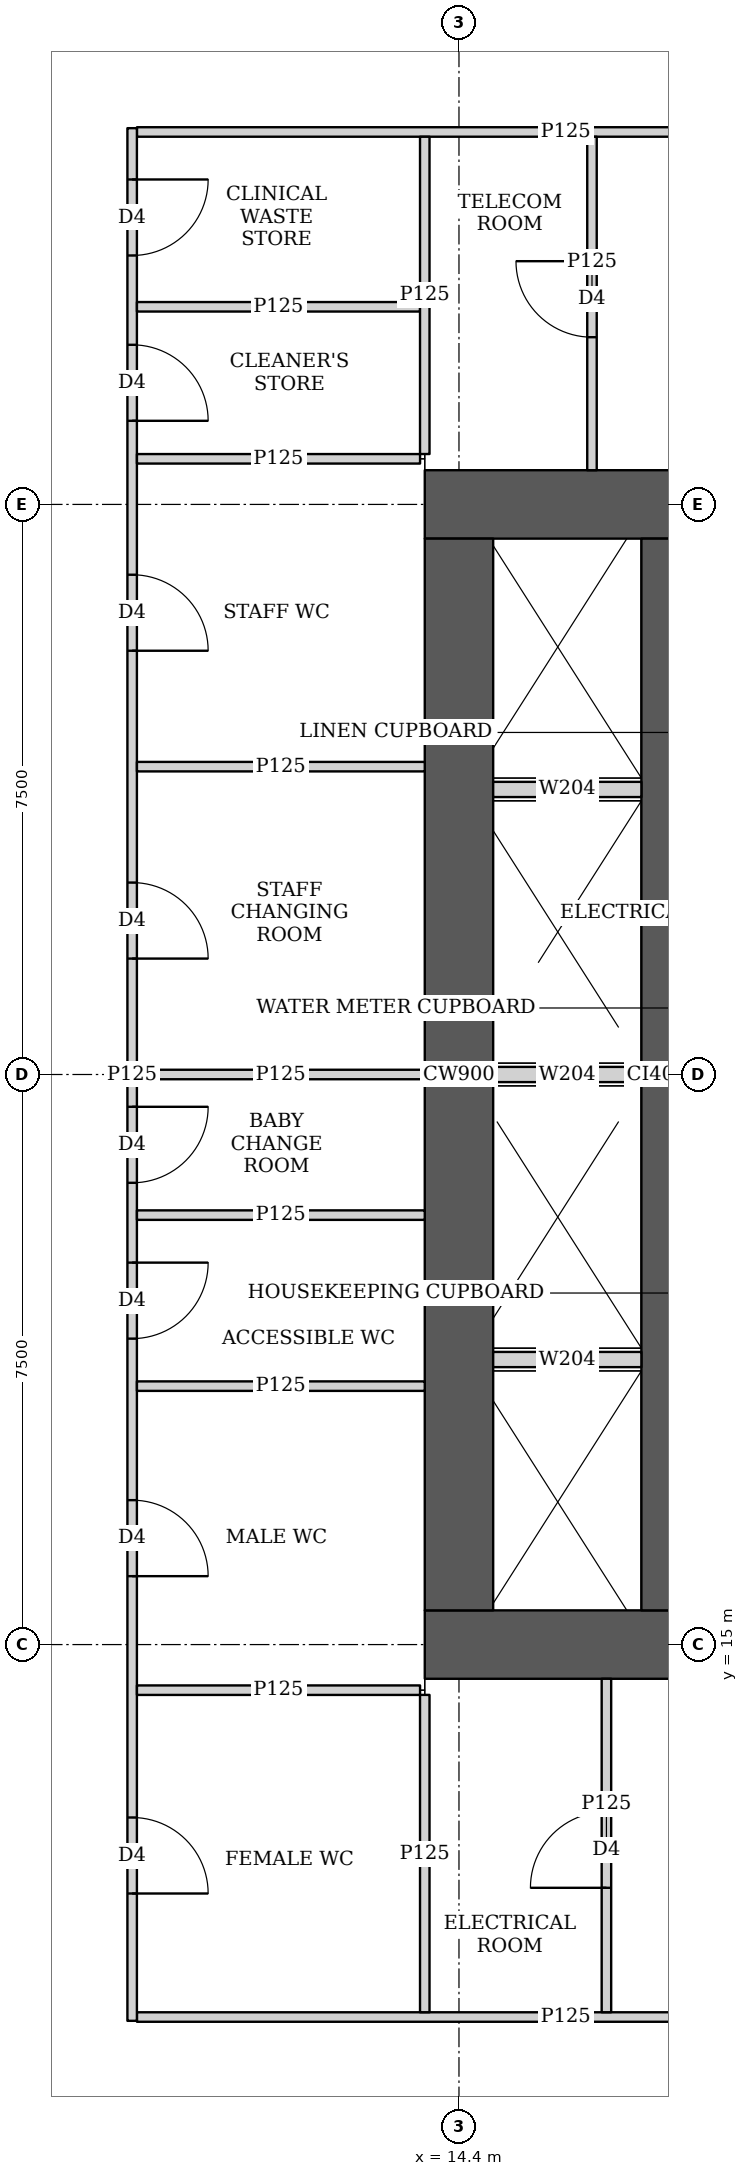
"""IFC4 building model, lengths in metres.
Left out: names, types, materials, properties, quantities, classifications, styles, units other than length and angle.
Written with IfcOpenShell. Run it as: python <this file> out.ifc"""

import sys

from ifc_helpers import new_model, si_unit, direction, frame, frame_2d, origin, place, context, subcontext, project, spatial, rectangle, extrude, element, fill, save


model = new_model("IFC4")
c1 = context("Model", 3, precision=1e-05, world=origin(), true_north=direction((0.0, 1.0)))
c2 = subcontext(c1, "Body", "Model", "MODEL_VIEW")
j1 = project(units=[si_unit("LENGTHUNIT", "METRE"), si_unit("PLANEANGLEUNIT", "RADIAN")], contexts=[c1])
p1 = place(None, origin())
s1 = spatial("IfcSite", under=j1, at=p1, CompositionType="ELEMENT")
p2 = place(p1, origin())
s2 = spatial("IfcBuilding", under=s1, at=p2, CompositionType="ELEMENT")
p3 = place(p2, frame((0.0, 0.0, 5.6)))
s3 = spatial("IfcBuildingStorey", under=s2, at=p3, CompositionType="ELEMENT", Elevation=5.6)
p4 = place(p3, frame((13.95, 15.0, 0.0), z_axis=(0.0, 0.0, 1.0), x_axis=(1.0, 0.0, 0.0)))
e1 = element("IfcWall", 1, at=p4, inside=s3, PredefinedType="SHEAR", context=c2, shape_type="SweptSolid", body=[
    extrude(rectangle(XDim=15.3, YDim=0.9, at=frame_2d((7.65, 0.0))), origin(), (0.0, 0.0, 1.0), 4.5),
])
p5 = place(p4, frame((4.45, 0.0, 0.0)))
e2 = element("IfcOpeningElement", 2, at=p5, cuts=e1, PredefinedType="OPENING", context=c2, shape_type="SweptSolid", body=[
    extrude(rectangle(XDim=1.8, YDim=2.1, at=frame_2d((0.9, 1.05))), frame((0.0, 0.46, 0.0), z_axis=(0.0, -1.0, 0.0), x_axis=(1.0, 0.0, 0.0)), (0.0, 0.0, 1.0), 0.92),
])
p6 = place(p4, frame((10.7, 0.0, 0.0)))
e3 = element("IfcOpeningElement", 3, at=p6, cuts=e1, PredefinedType="OPENING", context=c2, shape_type="SweptSolid", body=[
    extrude(rectangle(XDim=1.1, YDim=2.1, at=frame_2d((0.55, 1.05))), frame((0.0, 0.46, 0.0), z_axis=(0.0, -1.0, 0.0), x_axis=(1.0, 0.0, 0.0)), (0.0, 0.0, 1.0), 0.92),
])
p7 = place(p3, frame((13.95, 30.0, 0.0), z_axis=(0.0, 0.0, 1.0), x_axis=(1.0, 0.0, 0.0)))
e4 = element("IfcWall", 4, at=p7, inside=s3, PredefinedType="SHEAR", context=c2, shape_type="SweptSolid", body=[
    extrude(rectangle(XDim=15.3, YDim=0.9, at=frame_2d((7.65, 0.0))), origin(), (0.0, 0.0, 1.0), 4.5),
])
p8 = place(p7, frame((4.45, 0.0, 0.0)))
e5 = element("IfcOpeningElement", 5, at=p8, cuts=e4, PredefinedType="OPENING", context=c2, shape_type="SweptSolid", body=[
    extrude(rectangle(XDim=1.8, YDim=2.1, at=frame_2d((0.9, 1.05))), frame((0.0, 0.46, 0.0), z_axis=(0.0, -1.0, 0.0), x_axis=(1.0, 0.0, 0.0)), (0.0, 0.0, 1.0), 0.92),
])
p9 = place(p7, frame((10.7, 0.0, 0.0)))
e6 = element("IfcOpeningElement", 6, at=p9, cuts=e4, PredefinedType="OPENING", context=c2, shape_type="SweptSolid", body=[
    extrude(rectangle(XDim=1.1, YDim=2.1, at=frame_2d((0.55, 1.05))), frame((0.0, 0.46, 0.0), z_axis=(0.0, -1.0, 0.0), x_axis=(1.0, 0.0, 0.0)), (0.0, 0.0, 1.0), 0.92),
])
p10 = place(p3, frame((14.4, 15.45, 0.0), z_axis=(0.0, 0.0, 1.0), x_axis=(0.0, 1.0, 0.0)))
e7 = element("IfcWall", 7, at=p10, inside=s3, PredefinedType="SHEAR", context=c2, shape_type="SweptSolid", body=[
    extrude(rectangle(XDim=14.1, YDim=0.9, at=frame_2d((7.05, 0.0))), origin(), (0.0, 0.0, 1.0), 4.5),
])
p11 = place(p3, frame((17.0, 15.45, 0.0), z_axis=(0.0, 0.0, 1.0), x_axis=(0.0, 1.0, 0.0)))
e8 = element("IfcWall", 8, at=p11, inside=s3, PredefinedType="SHEAR", context=c2, shape_type="SweptSolid", body=[
    extrude(rectangle(XDim=14.1, YDim=0.4, at=frame_2d((7.05, 0.0))), origin(), (0.0, 0.0, 1.0), 4.5),
])
p12 = place(p3, frame((10.1, 10.05, 0.0), z_axis=(0.0, 0.0, 1.0), x_axis=(0.0, 1.0, 0.0)))
e9 = element("IfcWall", 9, at=p12, inside=s3, PredefinedType="PARTITIONING", context=c2, shape_type="SweptSolid", body=[
    extrude(rectangle(XDim=24.9, YDim=0.125, at=frame_2d((12.45, 0.0))), origin(), (0.0, 0.0, 1.0), 2.6),
])
p13 = place(p12, frame((1.675, 0.0, 0.0)))
e10 = element("IfcOpeningElement", 10, at=p13, cuts=e9, PredefinedType="OPENING", context=c2, shape_type="SweptSolid", body=[
    extrude(rectangle(XDim=1.0, YDim=2.1, at=frame_2d((0.5, 1.05))), frame((0.0, 0.073, 0.0), z_axis=(0.0, -1.0, 0.0), x_axis=(1.0, 0.0, 0.0)), (0.0, 0.0, 1.0), 0.145),
])
p14 = place(p12, frame((5.85, 0.0, 0.0)))
e11 = element("IfcOpeningElement", 11, at=p14, cuts=e9, PredefinedType="OPENING", context=c2, shape_type="SweptSolid", body=[
    extrude(rectangle(XDim=1.0, YDim=2.1, at=frame_2d((0.5, 1.05))), frame((0.0, 0.073, 0.0), z_axis=(0.0, -1.0, 0.0), x_axis=(1.0, 0.0, 0.0)), (0.0, 0.0, 1.0), 0.145),
])
p15 = place(p12, frame((8.975, 0.0, 0.0)))
e12 = element("IfcOpeningElement", 12, at=p15, cuts=e9, PredefinedType="OPENING", context=c2, shape_type="SweptSolid", body=[
    extrude(rectangle(XDim=1.0, YDim=2.1, at=frame_2d((0.5, 1.05))), frame((0.0, 0.073, 0.0), z_axis=(0.0, -1.0, 0.0), x_axis=(1.0, 0.0, 0.0)), (0.0, 0.0, 1.0), 0.145),
])
p16 = place(p12, frame((11.025, 0.0, 0.0)))
e13 = element("IfcOpeningElement", 13, at=p16, cuts=e9, PredefinedType="OPENING", context=c2, shape_type="SweptSolid", body=[
    extrude(rectangle(XDim=1.0, YDim=2.1, at=frame_2d((0.5, 1.05))), frame((0.0, 0.073, 0.0), z_axis=(0.0, -1.0, 0.0), x_axis=(1.0, 0.0, 0.0)), (0.0, 0.0, 1.0), 0.145),
])
p17 = place(p12, frame((13.975, 0.0, 0.0)))
e14 = element("IfcOpeningElement", 14, at=p17, cuts=e9, PredefinedType="OPENING", context=c2, shape_type="SweptSolid", body=[
    extrude(rectangle(XDim=1.0, YDim=2.1, at=frame_2d((0.5, 1.05))), frame((0.0, 0.073, 0.0), z_axis=(0.0, -1.0, 0.0), x_axis=(1.0, 0.0, 0.0)), (0.0, 0.0, 1.0), 0.145),
])
p18 = place(p12, frame((18.025, 0.0, 0.0)))
e15 = element("IfcOpeningElement", 15, at=p18, cuts=e9, PredefinedType="OPENING", context=c2, shape_type="SweptSolid", body=[
    extrude(rectangle(XDim=1.0, YDim=2.1, at=frame_2d((0.5, 1.05))), frame((0.0, 0.073, 0.0), z_axis=(0.0, -1.0, 0.0), x_axis=(1.0, 0.0, 0.0)), (0.0, 0.0, 1.0), 0.145),
])
p19 = place(p12, frame((21.05, 0.0, 0.0)))
e16 = element("IfcOpeningElement", 16, at=p19, cuts=e9, PredefinedType="OPENING", context=c2, shape_type="SweptSolid", body=[
    extrude(rectangle(XDim=1.0, YDim=2.1, at=frame_2d((0.5, 1.05))), frame((0.0, 0.073, 0.0), z_axis=(0.0, -1.0, 0.0), x_axis=(1.0, 0.0, 0.0)), (0.0, 0.0, 1.0), 0.145),
])
p20 = place(p12, frame((23.225, 0.0, 0.0)))
e17 = element("IfcOpeningElement", 17, at=p20, cuts=e9, PredefinedType="OPENING", context=c2, shape_type="SweptSolid", body=[
    extrude(rectangle(XDim=1.0, YDim=2.1, at=frame_2d((0.5, 1.05))), frame((0.0, 0.073, 0.0), z_axis=(0.0, -1.0, 0.0), x_axis=(1.0, 0.0, 0.0)), (0.0, 0.0, 1.0), 0.145),
])
p21 = place(p3, frame((10.163, 14.4, 0.0), z_axis=(0.0, 0.0, 1.0), x_axis=(1.0, 0.0, 0.0)))
e18 = element("IfcWall", 18, at=p21, inside=s3, PredefinedType="PARTITIONING", context=c2, shape_type="SweptSolid", body=[
    extrude(rectangle(XDim=3.725, YDim=0.125, at=frame_2d((1.862, 0.0))), origin(), (0.0, 0.0, 1.0), 2.6),
])
p22 = place(p3, frame((10.163, 22.5, 0.0), z_axis=(0.0, 0.0, 1.0), x_axis=(1.0, 0.0, 0.0)))
e19 = element("IfcWall", 19, at=p22, inside=s3, PredefinedType="PARTITIONING", context=c2, shape_type="SweptSolid", body=[
    extrude(rectangle(XDim=3.787, YDim=0.125, at=frame_2d((1.894, 0.0))), origin(), (0.0, 0.0, 1.0), 2.6),
])
p23 = place(p3, frame((10.163, 30.6, 0.0), z_axis=(0.0, 0.0, 1.0), x_axis=(1.0, 0.0, 0.0)))
e20 = element("IfcWall", 20, at=p23, inside=s3, PredefinedType="PARTITIONING", context=c2, shape_type="SweptSolid", body=[
    extrude(rectangle(XDim=3.725, YDim=0.125, at=frame_2d((1.862, 0.0))), origin(), (0.0, 0.0, 1.0), 2.6),
])
p24 = place(p3, frame((13.95, 10.163, 0.0), z_axis=(0.0, 0.0, 1.0), x_axis=(0.0, 1.0, 0.0)))
e21 = element("IfcWall", 21, at=p24, inside=s3, PredefinedType="PARTITIONING", context=c2, shape_type="SweptSolid", body=[
    extrude(rectangle(XDim=4.175, YDim=0.125, at=frame_2d((2.087, 0.0))), origin(), (0.0, 0.0, 1.0), 2.6),
])
p25 = place(p3, frame((13.95, 30.663, 0.0), z_axis=(0.0, 0.0, 1.0), x_axis=(0.0, 1.0, 0.0)))
e22 = element("IfcWall", 22, at=p25, inside=s3, PredefinedType="PARTITIONING", context=c2, shape_type="SweptSolid", body=[
    extrude(rectangle(XDim=4.174, YDim=0.125, at=frame_2d((2.087, 0.0))), origin(), (0.0, 0.0, 1.0), 2.6),
])
p26 = place(p3, frame((10.163, 10.1, 0.0), z_axis=(0.0, 0.0, 1.0), x_axis=(1.0, 0.0, 0.0)))
e23 = element("IfcWall", 23, at=p26, inside=s3, PredefinedType="PARTITIONING", context=c2, shape_type="SweptSolid", body=[
    extrude(rectangle(XDim=11.287, YDim=0.125, at=frame_2d((5.644, 0.0))), origin(), (0.0, 0.0, 1.0), 2.2),
])
p27 = place(p26, frame((7.832, 0.0, 0.0)))
e24 = element("IfcOpeningElement", 24, at=p27, cuts=e23, PredefinedType="OPENING", context=c2, shape_type="SweptSolid", body=[
    extrude(rectangle(XDim=1.8, YDim=2.1, at=frame_2d((0.9, 1.05))), frame((0.0, 0.073, 0.0), z_axis=(0.0, -1.0, 0.0), x_axis=(1.0, 0.0, 0.0)), (0.0, 0.0, 1.0), 0.145),
])
p28 = place(p3, frame((10.163, 34.9, 0.0), z_axis=(0.0, 0.0, 1.0), x_axis=(1.0, 0.0, 0.0)))
e25 = element("IfcWall", 25, at=p28, inside=s3, PredefinedType="PARTITIONING", context=c2, shape_type="SweptSolid", body=[
    extrude(rectangle(XDim=11.287, YDim=0.125, at=frame_2d((5.644, 0.0))), origin(), (0.0, 0.0, 1.0), 2.2),
])
p29 = place(p28, frame((7.737, 0.0, 0.0)))
e26 = element("IfcOpeningElement", 26, at=p29, cuts=e25, PredefinedType="OPENING", context=c2, shape_type="SweptSolid", body=[
    extrude(rectangle(XDim=1.8, YDim=2.1, at=frame_2d((0.9, 1.05))), frame((0.0, 0.073, 0.0), z_axis=(0.0, -1.0, 0.0), x_axis=(1.0, 0.0, 0.0)), (0.0, 0.0, 1.0), 0.145),
])
p30 = place(p3, frame((16.34, 10.163, 0.0), z_axis=(0.0, 0.0, 1.0), x_axis=(0.0, 1.0, 0.0)))
e27 = element("IfcWall", 27, at=p30, inside=s3, PredefinedType="PARTITIONING", context=c2, shape_type="SweptSolid", body=[
    extrude(rectangle(XDim=4.387, YDim=0.125, at=frame_2d((2.193, 0.0))), origin(), (0.0, 0.0, 1.0), 4.2),
])
p31 = place(p30, frame((1.637, 0.0, 0.0)))
e28 = element("IfcOpeningElement", 28, at=p31, cuts=e27, PredefinedType="OPENING", context=c2, shape_type="SweptSolid", body=[
    extrude(rectangle(XDim=1.0, YDim=2.1, at=frame_2d((0.5, 1.05))), frame((0.0, 0.073, 0.0), z_axis=(0.0, -1.0, 0.0), x_axis=(1.0, 0.0, 0.0)), (0.0, 0.0, 1.0), 0.145),
])
p32 = place(p3, frame((16.15, 30.45, 0.0), z_axis=(0.0, 0.0, 1.0), x_axis=(0.0, 1.0, 0.0)))
e29 = element("IfcWall", 29, at=p32, inside=s3, PredefinedType="PARTITIONING", context=c2, shape_type="SweptSolid", body=[
    extrude(rectangle(XDim=4.387, YDim=0.125, at=frame_2d((2.193, 0.0))), origin(), (0.0, 0.0, 1.0), 4.2),
])
p33 = place(p32, frame((1.75, 0.0, 0.0)))
e30 = element("IfcOpeningElement", 30, at=p33, cuts=e29, PredefinedType="OPENING", context=c2, shape_type="SweptSolid", body=[
    extrude(rectangle(XDim=1.0, YDim=2.1, at=frame_2d((0.5, 1.05))), frame((0.0, 0.073, 0.0), z_axis=(0.0, -1.0, 0.0), x_axis=(1.0, 0.0, 0.0)), (0.0, 0.0, 1.0), 0.145),
])
for number, where, z_axis, x_axis in (
    (31, (10.163, 18.4, 0.0), (0.0, 0.0, 1.0), (1.0, 0.0, 0.0)),
    (32, (10.163, 20.65, 0.0), (0.0, 0.0, 1.0), (1.0, 0.0, 0.0)),
    (33, (10.163, 26.55, 0.0), (0.0, 0.0, 1.0), (1.0, 0.0, 0.0)),
):
    element("IfcWall", number, at=place(p3, frame(where, z_axis=z_axis, x_axis=x_axis)), inside=s3, PredefinedType="PARTITIONING", context=c2, shape_type="SweptSolid", body=[
        extrude(rectangle(XDim=3.787, YDim=0.125, at=frame_2d((1.894, 0.0))), origin(), (0.0, 0.0, 1.0), 4.2),
    ])
p34 = place(p3, frame((10.163, 32.6, 0.0), z_axis=(0.0, 0.0, 1.0), x_axis=(1.0, 0.0, 0.0)))
e34 = element("IfcWall", 34, at=p34, inside=s3, PredefinedType="PARTITIONING", context=c2, shape_type="SweptSolid", body=[
    extrude(rectangle(XDim=3.725, YDim=0.125, at=frame_2d((1.862, 0.0))), origin(), (0.0, 0.0, 1.0), 2.6),
])
for number, where, z_axis, x_axis in (
    (35, (14.85, 18.75, 0.0), (0.0, 0.0, 1.0), (1.0, 0.0, 0.0)),
    (36, (14.85, 22.5, 0.0), (0.0, 0.0, 1.0), (1.0, 0.0, 0.0)),
    (37, (14.85, 26.25, 0.0), (0.0, 0.0, 1.0), (1.0, 0.0, 0.0)),
):
    element("IfcWall", number, at=place(p3, frame(where, z_axis=z_axis, x_axis=x_axis)), inside=s3, PredefinedType="SOLIDWALL", context=c2, shape_type="SweptSolid", body=[
        extrude(rectangle(XDim=1.95, YDim=0.2, at=frame_2d((0.975, 0.0))), origin(), (0.0, 0.0, 1.0), 4.2),
    ])
p35 = place(p13, origin())
e38 = element("IfcDoor", 38, at=p35, inside=s3, OperationType="SINGLE_SWING_RIGHT", PredefinedType="DOOR", context=c2, shape_type="SweptSolid", body=[
    extrude(rectangle(XDim=1.0, YDim=2.1, at=frame_2d((0.5, 1.05))), frame((0.0, 0.025, 0.0), z_axis=(0.0, -1.0, 0.0), x_axis=(1.0, 0.0, 0.0)), (0.0, 0.0, 1.0), 0.05),
])
fill(e10, e38)
p36 = place(p31, origin())
e39 = element("IfcDoor", 39, at=p36, inside=s3, OperationType="SINGLE_SWING_LEFT", PredefinedType="DOOR", context=c2, shape_type="SweptSolid", body=[
    extrude(rectangle(XDim=1.0, YDim=2.1, at=frame_2d((0.5, 1.05))), frame((0.0, 0.025, 0.0), z_axis=(0.0, -1.0, 0.0), x_axis=(1.0, 0.0, 0.0)), (0.0, 0.0, 1.0), 0.05),
])
fill(e28, e39)
p37 = place(p33, origin())
e40 = element("IfcDoor", 40, at=p37, inside=s3, OperationType="SINGLE_SWING_RIGHT", PredefinedType="DOOR", context=c2, shape_type="SweptSolid", body=[
    extrude(rectangle(XDim=1.0, YDim=2.1, at=frame_2d((0.5, 1.05))), frame((0.0, 0.025, 0.0), z_axis=(0.0, -1.0, 0.0), x_axis=(1.0, 0.0, 0.0)), (0.0, 0.0, 1.0), 0.05),
])
fill(e30, e40)
p38 = place(p14, origin())
e41 = element("IfcDoor", 41, at=p38, inside=s3, OperationType="SINGLE_SWING_RIGHT", PredefinedType="DOOR", context=c2, shape_type="SweptSolid", body=[
    extrude(rectangle(XDim=1.0, YDim=2.1, at=frame_2d((0.5, 1.05))), frame((0.0, 0.025, 0.0), z_axis=(0.0, -1.0, 0.0), x_axis=(1.0, 0.0, 0.0)), (0.0, 0.0, 1.0), 0.05),
])
fill(e11, e41)
p39 = place(p15, origin())
e42 = element("IfcDoor", 42, at=p39, inside=s3, OperationType="SINGLE_SWING_LEFT", PredefinedType="DOOR", context=c2, shape_type="SweptSolid", body=[
    extrude(rectangle(XDim=1.0, YDim=2.1, at=frame_2d((0.5, 1.05))), frame((0.0, 0.025, 0.0), z_axis=(0.0, -1.0, 0.0), x_axis=(1.0, 0.0, 0.0)), (0.0, 0.0, 1.0), 0.05),
])
fill(e12, e42)
p40 = place(p16, origin())
e43 = element("IfcDoor", 43, at=p40, inside=s3, OperationType="SINGLE_SWING_LEFT", PredefinedType="DOOR", context=c2, shape_type="SweptSolid", body=[
    extrude(rectangle(XDim=1.0, YDim=2.1, at=frame_2d((0.5, 1.05))), frame((0.0, 0.025, 0.0), z_axis=(0.0, -1.0, 0.0), x_axis=(1.0, 0.0, 0.0)), (0.0, 0.0, 1.0), 0.05),
])
fill(e13, e43)
p41 = place(p17, origin())
e44 = element("IfcDoor", 44, at=p41, inside=s3, OperationType="SINGLE_SWING_RIGHT", PredefinedType="DOOR", context=c2, shape_type="SweptSolid", body=[
    extrude(rectangle(XDim=1.0, YDim=2.1, at=frame_2d((0.5, 1.05))), frame((0.0, 0.025, 0.0), z_axis=(0.0, -1.0, 0.0), x_axis=(1.0, 0.0, 0.0)), (0.0, 0.0, 1.0), 0.05),
])
fill(e14, e44)
p42 = place(p18, origin())
e45 = element("IfcDoor", 45, at=p42, inside=s3, OperationType="SINGLE_SWING_RIGHT", PredefinedType="DOOR", context=c2, shape_type="SweptSolid", body=[
    extrude(rectangle(XDim=1.0, YDim=2.1, at=frame_2d((0.5, 1.05))), frame((0.0, 0.025, 0.0), z_axis=(0.0, -1.0, 0.0), x_axis=(1.0, 0.0, 0.0)), (0.0, 0.0, 1.0), 0.05),
])
fill(e15, e45)
p43 = place(p19, origin())
e46 = element("IfcDoor", 46, at=p43, inside=s3, OperationType="SINGLE_SWING_RIGHT", PredefinedType="DOOR", context=c2, shape_type="SweptSolid", body=[
    extrude(rectangle(XDim=1.0, YDim=2.1, at=frame_2d((0.5, 1.05))), frame((0.0, 0.025, 0.0), z_axis=(0.0, -1.0, 0.0), x_axis=(1.0, 0.0, 0.0)), (0.0, 0.0, 1.0), 0.05),
])
fill(e16, e46)
p44 = place(p20, origin())
e47 = element("IfcDoor", 47, at=p44, inside=s3, OperationType="SINGLE_SWING_LEFT", PredefinedType="DOOR", context=c2, shape_type="SweptSolid", body=[
    extrude(rectangle(XDim=1.0, YDim=2.1, at=frame_2d((0.5, 1.05))), frame((0.0, 0.025, 0.0), z_axis=(0.0, -1.0, 0.0), x_axis=(1.0, 0.0, 0.0)), (0.0, 0.0, 1.0), 0.05),
])
fill(e17, e47)
save(model, sys.argv[1])
